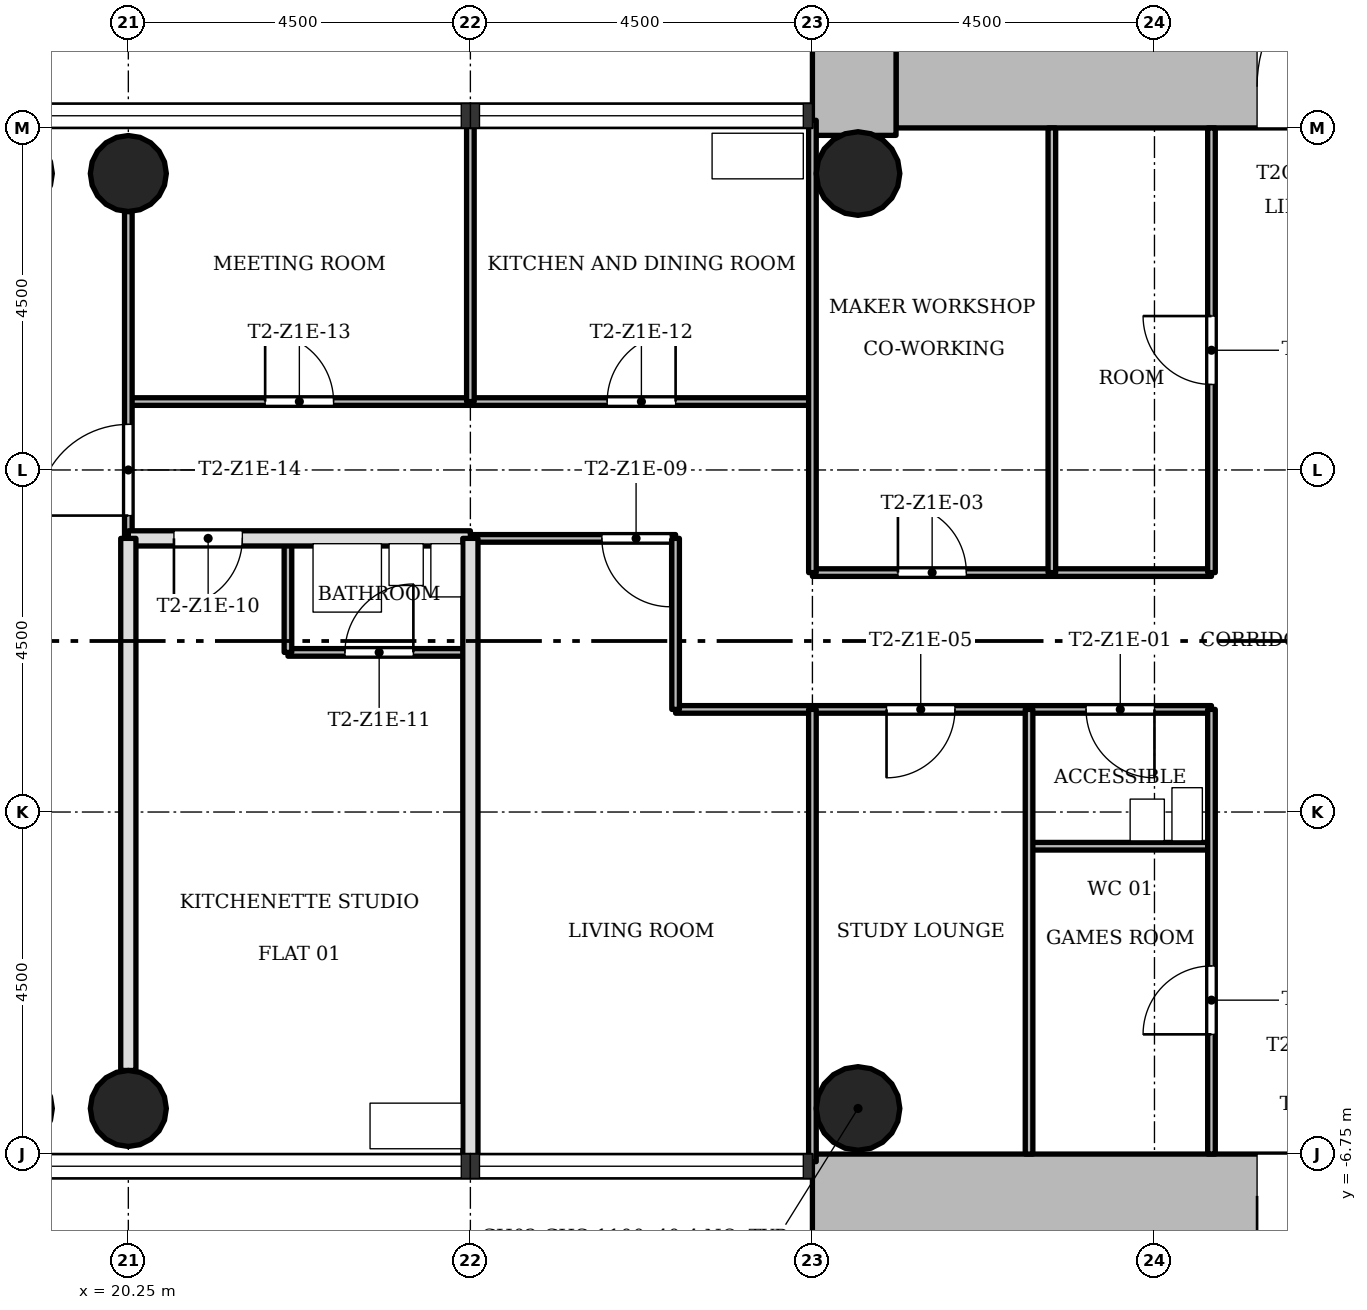
"""IFC4 building model, lengths in metres.
Left out: names, types, materials, properties, quantities, classifications, styles, units other than length and angle.
Written with IfcOpenShell. Run it as: python <this file> out.ifc"""

import sys

from ifc_helpers import new_model, si_unit, direction, frame, frame_2d, origin, origin_2d, place, context, subcontext, project, spatial, rectangle, hollow_circle, extrude, element, fill, save


model = new_model("IFC4")
c1 = context("Model", 3, precision=1e-05, world=origin(), true_north=direction((0.0, 1.0)))
c2 = subcontext(c1, "Body", "Model", "MODEL_VIEW")
j1 = project(units=[si_unit("LENGTHUNIT", "METRE"), si_unit("PLANEANGLEUNIT", "RADIAN")], contexts=[c1])
p1 = place(None, origin())
s1 = spatial("IfcSite", under=j1, at=p1, CompositionType="ELEMENT")
p2 = place(p1, origin())
s2 = spatial("IfcBuilding", under=s1, at=p2, CompositionType="ELEMENT")
p3 = place(p2, frame((0.0, 0.0, 65.3)))
s3 = spatial("IfcBuildingStorey", under=s2, at=p3, CompositionType="ELEMENT", Elevation=65.3)
p4 = place(p3, frame((30.35, 7.3, 0.0), z_axis=(0.0, 0.0, 1.0), x_axis=(1.0, 0.0, 0.0)))
e1 = element("IfcWall", 1, at=p4, inside=s3, PredefinedType="SHEAR", context=c2, shape_type="SweptSolid", body=[
    extrude(rectangle(XDim=12.4, YDim=1.1, at=frame_2d((6.2, 0.0))), origin(), (0.0, 0.0, 1.0), 3.4),
])
p5 = place(p4, frame((4.75, 0.0, 0.0)))
e2 = element("IfcOpeningElement", 2, at=p5, cuts=e1, PredefinedType="OPENING", context=c2, shape_type="SweptSolid", body=[
    extrude(rectangle(XDim=1.8, YDim=2.1, at=frame_2d((0.9, 1.05))), frame((0.0, 0.56, 0.0), z_axis=(0.0, -1.0, 0.0), x_axis=(1.0, 0.0, 0.0)), (0.0, 0.0, 1.0), 1.12),
])
p6 = place(p3, frame((29.8, 15.248, 0.0), z_axis=(0.0, 0.0, 1.0), x_axis=(0.0, -1.0, 0.0)))
e3 = element("IfcWall", 3, at=p6, inside=s3, PredefinedType="SHEAR", context=c2, shape_type="SweptSolid", body=[
    extrude(rectangle(XDim=8.596, YDim=1.1, at=frame_2d((4.298, 0.0))), origin(), (0.0, 0.0, 1.0), 3.4),
])
p7 = place(p3, frame((41.65, -7.3, 0.0), z_axis=(0.0, 0.0, 1.0), x_axis=(-1.0, 0.0, 0.0)))
e4 = element("IfcWall", 4, at=p7, inside=s3, PredefinedType="SHEAR", context=c2, shape_type="SweptSolid", body=[
    extrude(rectangle(XDim=12.4, YDim=1.1, at=frame_2d((6.2, 0.0))), origin(), (0.0, 0.0, 1.0), 3.4),
])
p8 = place(p7, frame((4.75, 0.0, 0.0)))
e5 = element("IfcOpeningElement", 5, at=p8, cuts=e4, PredefinedType="OPENING", context=c2, shape_type="SweptSolid", body=[
    extrude(rectangle(XDim=1.8, YDim=2.1, at=frame_2d((0.9, 1.05))), frame((0.0, 0.56, 0.0), z_axis=(0.0, -1.0, 0.0), x_axis=(1.0, 0.0, 0.0)), (0.0, 0.0, 1.0), 1.12),
])
for number, where, z_axis, x_axis in (
    (6, (20.25, 6.15, 0.0), (0.0, 0.0, 1.0), (1.0, 0.0, 0.0)),
    (7, (20.25, -6.15, 0.0), (0.0, 0.0, 1.0), (1.0, 0.0, 0.0)),
):
    element("IfcColumn", number, at=place(p3, frame(where, z_axis=z_axis, x_axis=x_axis)), inside=s3, PredefinedType="COLUMN", context=c2, shape_type="SweptSolid", body=[
        extrude(hollow_circle(Radius=0.5, WallThickness=0.036, at=origin_2d()), origin(), (0.0, 0.0, 1.0), 3.4),
    ])
for number, where, z_axis, x_axis in (
    (8, (29.85, 6.15, 0.0), (0.0, 0.0, 1.0), (1.0, 0.0, 0.0)),
    (9, (29.85, -6.15, 0.0), (0.0, 0.0, 1.0), (1.0, 0.0, 0.0)),
):
    element("IfcColumn", number, at=place(p3, frame(where, z_axis=z_axis, x_axis=x_axis)), inside=s3, PredefinedType="COLUMN", context=c2, shape_type="SweptSolid", body=[
        extrude(hollow_circle(Radius=0.55, WallThickness=0.04, at=origin_2d()), origin(), (0.0, 0.0, 1.0), 3.4),
    ])
p9 = place(p3, frame((34.5, -2.7, 0.0), z_axis=(0.0, 0.0, 1.0), x_axis=(-1.0, 0.0, 0.0)))
e10 = element("IfcWall", 10, at=p9, inside=s3, PredefinedType="PARTITIONING", context=c2, shape_type="SweptSolid", body=[
    extrude(rectangle(XDim=2.4, YDim=0.1, at=frame_2d((1.2, 0.0))), origin(), (0.0, 0.0, 1.0), 3.0),
])
p10 = place(p3, frame((34.5, -0.9, 0.0), z_axis=(0.0, 0.0, 1.0), x_axis=(-1.0, 0.0, 0.0)))
e11 = element("IfcWall", 11, at=p10, inside=s3, PredefinedType="PARTITIONING", context=c2, shape_type="SweptSolid", body=[
    extrude(rectangle(XDim=7.05, YDim=0.1, at=frame_2d((3.525, 0.0))), origin(), (0.0, 0.0, 1.0), 3.0),
])
p11 = place(p10, frame((0.75, 0.0, 0.0)))
e12 = element("IfcOpeningElement", 12, at=p11, cuts=e11, PredefinedType="OPENING", context=c2, shape_type="SweptSolid", body=[
    extrude(rectangle(XDim=0.9, YDim=2.1, at=frame_2d((0.45, 1.05))), frame((0.0, 0.06, 0.0), z_axis=(0.0, -1.0, 0.0), x_axis=(1.0, 0.0, 0.0)), (0.0, 0.0, 1.0), 0.12),
])
p12 = place(p10, frame((3.375, 0.0, 0.0)))
e13 = element("IfcOpeningElement", 13, at=p12, cuts=e11, PredefinedType="OPENING", context=c2, shape_type="SweptSolid", body=[
    extrude(rectangle(XDim=0.9, YDim=2.1, at=frame_2d((0.45, 1.05))), frame((0.0, 0.06, 0.0), z_axis=(0.0, -1.0, 0.0), x_axis=(1.0, 0.0, 0.0)), (0.0, 0.0, 1.0), 0.12),
])
p13 = place(p3, frame((24.75, -0.15, 0.0), z_axis=(0.0, 0.0, 1.0), x_axis=(-1.0, 0.0, 0.0)))
e14 = element("IfcWall", 14, at=p13, inside=s3, PredefinedType="PARTITIONING", context=c2, shape_type="SweptSolid", body=[
    extrude(rectangle(XDim=2.4, YDim=0.1, at=frame_2d((1.2, 0.0))), origin(), (0.0, 0.0, 1.0), 3.0),
])
p14 = place(p13, frame((0.75, 0.0, 0.0)))
e15 = element("IfcOpeningElement", 15, at=p14, cuts=e14, PredefinedType="OPENING", context=c2, shape_type="SweptSolid", body=[
    extrude(rectangle(XDim=0.9, YDim=2.1, at=frame_2d((0.45, 1.05))), frame((0.0, 0.06, 0.0), z_axis=(0.0, -1.0, 0.0), x_axis=(1.0, 0.0, 0.0)), (0.0, 0.0, 1.0), 0.12),
])
p15 = place(p3, frame((34.5, 0.9, 0.0), z_axis=(0.0, 0.0, 1.0), x_axis=(-1.0, 0.0, 0.0)))
e16 = element("IfcWall", 16, at=p15, inside=s3, PredefinedType="PARTITIONING", context=c2, shape_type="SweptSolid", body=[
    extrude(rectangle(XDim=5.25, YDim=0.1, at=frame_2d((2.625, 0.0))), origin(), (0.0, 0.0, 1.0), 3.0),
])
p16 = place(p15, frame((3.225, 0.0, 0.0)))
e17 = element("IfcOpeningElement", 17, at=p16, cuts=e16, PredefinedType="OPENING", context=c2, shape_type="SweptSolid", body=[
    extrude(rectangle(XDim=0.9, YDim=2.1, at=frame_2d((0.45, 1.05))), frame((0.0, 0.06, 0.0), z_axis=(0.0, -1.0, 0.0), x_axis=(1.0, 0.0, 0.0)), (0.0, 0.0, 1.0), 0.12),
])
p17 = place(p3, frame((27.45, 1.35, 0.0), z_axis=(0.0, 0.0, 1.0), x_axis=(-1.0, 0.0, 0.0)))
e18 = element("IfcWall", 18, at=p17, inside=s3, PredefinedType="PARTITIONING", context=c2, shape_type="SweptSolid", body=[
    extrude(rectangle(XDim=2.7, YDim=0.1, at=frame_2d((1.35, 0.0))), origin(), (0.0, 0.0, 1.0), 3.0),
])
p18 = place(p17, frame((0.07, 0.0, 0.0)))
e19 = element("IfcOpeningElement", 19, at=p18, cuts=e18, PredefinedType="OPENING", context=c2, shape_type="SweptSolid", body=[
    extrude(rectangle(XDim=0.9, YDim=2.1, at=frame_2d((0.45, 1.05))), frame((0.0, 0.06, 0.0), z_axis=(0.0, -1.0, 0.0), x_axis=(1.0, 0.0, 0.0)), (0.0, 0.0, 1.0), 0.12),
])
p19 = place(p3, frame((24.75, 1.35, 0.0), z_axis=(0.0, 0.0, 1.0), x_axis=(-1.0, 0.0, 0.0)))
e20 = element("IfcWall", 20, at=p19, inside=s3, PredefinedType="SOLIDWALL", context=c2, shape_type="SweptSolid", body=[
    extrude(rectangle(XDim=4.5, YDim=0.2, at=frame_2d((2.25, 0.0))), origin(), (0.0, 0.0, 1.0), 3.0),
])
p20 = place(p19, frame((3.0, 0.0, 0.0)))
e21 = element("IfcOpeningElement", 21, at=p20, cuts=e20, PredefinedType="OPENING", context=c2, shape_type="SweptSolid", body=[
    extrude(rectangle(XDim=0.9, YDim=2.1, at=frame_2d((0.45, 1.05))), frame((0.0, 0.11, 0.0), z_axis=(0.0, -1.0, 0.0), x_axis=(1.0, 0.0, 0.0)), (0.0, 0.0, 1.0), 0.22),
])
p21 = place(p3, frame((29.25, 3.15, 0.0), z_axis=(0.0, 0.0, 1.0), x_axis=(-1.0, 0.0, 0.0)))
e22 = element("IfcWall", 22, at=p21, inside=s3, PredefinedType="PARTITIONING", context=c2, shape_type="SweptSolid", body=[
    extrude(rectangle(XDim=9.0, YDim=0.1, at=frame_2d((4.5, 0.0))), origin(), (0.0, 0.0, 1.0), 3.0),
])
p22 = place(p21, frame((1.8, 0.0, 0.0)))
e23 = element("IfcOpeningElement", 23, at=p22, cuts=e22, PredefinedType="OPENING", context=c2, shape_type="SweptSolid", body=[
    extrude(rectangle(XDim=0.9, YDim=2.1, at=frame_2d((0.45, 1.05))), frame((0.0, 0.06, 0.0), z_axis=(0.0, -1.0, 0.0), x_axis=(1.0, 0.0, 0.0)), (0.0, 0.0, 1.0), 0.12),
])
p23 = place(p21, frame((6.3, 0.0, 0.0)))
e24 = element("IfcOpeningElement", 24, at=p23, cuts=e22, PredefinedType="OPENING", context=c2, shape_type="SweptSolid", body=[
    extrude(rectangle(XDim=0.9, YDim=2.1, at=frame_2d((0.45, 1.05))), frame((0.0, 0.06, 0.0), z_axis=(0.0, -1.0, 0.0), x_axis=(1.0, 0.0, 0.0)), (0.0, 0.0, 1.0), 0.12),
])
p24 = place(p3, frame((34.5, -6.75, 0.0), z_axis=(0.0, 0.0, 1.0), x_axis=(0.0, 1.0, 0.0)))
e25 = element("IfcWall", 25, at=p24, inside=s3, PredefinedType="PARTITIONING", context=c2, shape_type="SweptSolid", body=[
    extrude(rectangle(XDim=5.85, YDim=0.1, at=frame_2d((2.925, 0.0))), origin(), (0.0, 0.0, 1.0), 3.0),
])
p25 = place(p24, frame((1.575, 0.0, 0.0)))
e26 = element("IfcOpeningElement", 26, at=p25, cuts=e25, PredefinedType="OPENING", context=c2, shape_type="SweptSolid", body=[
    extrude(rectangle(XDim=0.9, YDim=2.1, at=frame_2d((0.45, 1.05))), frame((0.0, 0.06, 0.0), z_axis=(0.0, -1.0, 0.0), x_axis=(1.0, 0.0, 0.0)), (0.0, 0.0, 1.0), 0.12),
])
p26 = place(p3, frame((34.5, 0.9, 0.0), z_axis=(0.0, 0.0, 1.0), x_axis=(0.0, 1.0, 0.0)))
e27 = element("IfcWall", 27, at=p26, inside=s3, PredefinedType="PARTITIONING", context=c2, shape_type="SweptSolid", body=[
    extrude(rectangle(XDim=5.85, YDim=0.1, at=frame_2d((2.925, 0.0))), origin(), (0.0, 0.0, 1.0), 3.0),
])
p27 = place(p26, frame((2.475, 0.0, 0.0)))
e28 = element("IfcOpeningElement", 28, at=p27, cuts=e27, PredefinedType="OPENING", context=c2, shape_type="SweptSolid", body=[
    extrude(rectangle(XDim=0.9, YDim=2.1, at=frame_2d((0.45, 1.05))), frame((0.0, 0.06, 0.0), z_axis=(0.0, -1.0, 0.0), x_axis=(1.0, 0.0, 0.0)), (0.0, 0.0, 1.0), 0.12),
])
for number, where, z_axis, x_axis in (
    (29, (32.4, 0.9, 0.0), (0.0, 0.0, 1.0), (0.0, 1.0, 0.0)),
    (30, (32.1, -6.75, 0.0), (0.0, 0.0, 1.0), (0.0, 1.0, 0.0)),
):
    element("IfcWall", number, at=place(p3, frame(where, z_axis=z_axis, x_axis=x_axis)), inside=s3, PredefinedType="PARTITIONING", context=c2, shape_type="SweptSolid", body=[
        extrude(rectangle(XDim=5.85, YDim=0.1, at=frame_2d((2.925, 0.0))), origin(), (0.0, 0.0, 1.0), 3.0),
    ])
for number, where, z_axis, x_axis in (
    (31, (29.25, -6.85, 0.0), (0.0, 0.0, 1.0), (0.0, 1.0, 0.0)),
    (32, (29.25, 0.9, 0.0), (0.0, 0.0, 1.0), (0.0, 1.0, 0.0)),
):
    element("IfcWall", number, at=place(p3, frame(where, z_axis=z_axis, x_axis=x_axis)), inside=s3, PredefinedType="PARTITIONING", context=c2, shape_type="SweptSolid", body=[
        extrude(rectangle(XDim=5.95, YDim=0.1, at=frame_2d((2.975, 0.0))), origin(), (0.0, 0.0, 1.0), 3.0),
    ])
p28 = place(p3, frame((27.45, -0.9, 0.0), z_axis=(0.0, 0.0, 1.0), x_axis=(0.0, 1.0, 0.0)))
e33 = element("IfcWall", 33, at=p28, inside=s3, PredefinedType="PARTITIONING", context=c2, shape_type="SweptSolid", body=[
    extrude(rectangle(XDim=2.25, YDim=0.1, at=frame_2d((1.125, 0.0))), origin(), (0.0, 0.0, 1.0), 3.0),
])
p29 = place(p3, frame((24.75, 3.15, 0.0), z_axis=(0.0, 0.0, 1.0), x_axis=(0.0, 1.0, 0.0)))
e34 = element("IfcWall", 34, at=p29, inside=s3, PredefinedType="PARTITIONING", context=c2, shape_type="SweptSolid", body=[
    extrude(rectangle(XDim=3.7, YDim=0.1, at=frame_2d((1.85, 0.0))), origin(), (0.0, 0.0, 1.0), 3.0),
])
p30 = place(p3, frame((24.75, -6.85, 0.0), z_axis=(0.0, 0.0, 1.0), x_axis=(0.0, 1.0, 0.0)))
e35 = element("IfcWall", 35, at=p30, inside=s3, PredefinedType="SOLIDWALL", context=c2, shape_type="SweptSolid", body=[
    extrude(rectangle(XDim=8.2, YDim=0.2, at=frame_2d((4.1, 0.0))), origin(), (0.0, 0.0, 1.0), 3.0),
])
p31 = place(p3, frame((22.35, -0.15, 0.0), z_axis=(0.0, 0.0, 1.0), x_axis=(0.0, 1.0, 0.0)))
e36 = element("IfcWall", 36, at=p31, inside=s3, PredefinedType="PARTITIONING", context=c2, shape_type="SweptSolid", body=[
    extrude(rectangle(XDim=1.5, YDim=0.1, at=frame_2d((0.75, 0.0))), origin(), (0.0, 0.0, 1.0), 3.0),
])
p32 = place(p3, frame((20.25, 1.35, 0.0), z_axis=(0.0, 0.0, 1.0), x_axis=(0.0, 1.0, 0.0)))
e37 = element("IfcWall", 37, at=p32, inside=s3, PredefinedType="PARTITIONING", context=c2, shape_type="SweptSolid", body=[
    extrude(rectangle(XDim=4.3, YDim=0.1, at=frame_2d((2.15, 0.0))), origin(), (0.0, 0.0, 1.0), 3.0),
])
p33 = place(p32, frame((0.3, 0.0, 0.0)))
e38 = element("IfcOpeningElement", 38, at=p33, cuts=e37, PredefinedType="OPENING", context=c2, shape_type="SweptSolid", body=[
    extrude(rectangle(XDim=1.2, YDim=2.1, at=frame_2d((0.6, 1.05))), frame((0.0, 0.06, 0.0), z_axis=(0.0, -1.0, 0.0), x_axis=(1.0, 0.0, 0.0)), (0.0, 0.0, 1.0), 0.12),
])
p34 = place(p3, frame((20.25, -5.65, 0.0), z_axis=(0.0, 0.0, 1.0), x_axis=(0.0, 1.0, 0.0)))
e39 = element("IfcWall", 39, at=p34, inside=s3, PredefinedType="SOLIDWALL", context=c2, shape_type="SweptSolid", body=[
    extrude(rectangle(XDim=7.0, YDim=0.2, at=frame_2d((3.5, 0.0))), origin(), (0.0, 0.0, 1.0), 3.0),
])
p35 = place(p11, origin())
e40 = element("IfcDoor", 40, at=p35, inside=s3, OperationType="SINGLE_SWING_RIGHT", PredefinedType="DOOR", context=c2, shape_type="SweptSolid", body=[
    extrude(rectangle(XDim=0.9, YDim=2.1, at=frame_2d((0.45, 1.05))), frame((0.0, 0.025, 0.0), z_axis=(0.0, -1.0, 0.0), x_axis=(1.0, 0.0, 0.0)), (0.0, 0.0, 1.0), 0.05),
])
fill(e12, e40)
p36 = place(p27, origin())
e41 = element("IfcDoor", 41, at=p36, inside=s3, OperationType="SINGLE_SWING_LEFT", PredefinedType="DOOR", context=c2, shape_type="SweptSolid", body=[
    extrude(rectangle(XDim=0.9, YDim=2.1, at=frame_2d((0.45, 1.05))), frame((0.0, 0.025, 0.0), z_axis=(0.0, -1.0, 0.0), x_axis=(1.0, 0.0, 0.0)), (0.0, 0.0, 1.0), 0.05),
])
fill(e28, e41)
p37 = place(p16, origin())
e42 = element("IfcDoor", 42, at=p37, inside=s3, OperationType="SINGLE_SWING_RIGHT", PredefinedType="DOOR", context=c2, shape_type="SweptSolid", body=[
    extrude(rectangle(XDim=0.9, YDim=2.1, at=frame_2d((0.45, 1.05))), frame((0.0, 0.025, 0.0), z_axis=(0.0, -1.0, 0.0), x_axis=(1.0, 0.0, 0.0)), (0.0, 0.0, 1.0), 0.05),
])
fill(e17, e42)
p38 = place(p25, origin())
e43 = element("IfcDoor", 43, at=p38, inside=s3, OperationType="SINGLE_SWING_RIGHT", PredefinedType="DOOR", context=c2, shape_type="SweptSolid", body=[
    extrude(rectangle(XDim=0.9, YDim=2.1, at=frame_2d((0.45, 1.05))), frame((0.0, 0.025, 0.0), z_axis=(0.0, -1.0, 0.0), x_axis=(1.0, 0.0, 0.0)), (0.0, 0.0, 1.0), 0.05),
])
fill(e26, e43)
p39 = place(p12, origin())
e44 = element("IfcDoor", 44, at=p39, inside=s3, OperationType="SINGLE_SWING_LEFT", PredefinedType="DOOR", context=c2, shape_type="SweptSolid", body=[
    extrude(rectangle(XDim=0.9, YDim=2.1, at=frame_2d((0.45, 1.05))), frame((0.0, 0.025, 0.0), z_axis=(0.0, -1.0, 0.0), x_axis=(1.0, 0.0, 0.0)), (0.0, 0.0, 1.0), 0.05),
])
fill(e13, e44)
p40 = place(p18, origin())
e45 = element("IfcDoor", 45, at=p40, inside=s3, OperationType="SINGLE_SWING_RIGHT", PredefinedType="DOOR", context=c2, shape_type="SweptSolid", body=[
    extrude(rectangle(XDim=0.9, YDim=2.1, at=frame_2d((0.45, 1.05))), frame((0.0, 0.025, 0.0), z_axis=(0.0, -1.0, 0.0), x_axis=(1.0, 0.0, 0.0)), (0.0, 0.0, 1.0), 0.05),
])
fill(e19, e45)
p41 = place(p20, origin())
e46 = element("IfcDoor", 46, at=p41, inside=s3, OperationType="SINGLE_SWING_LEFT", PredefinedType="DOOR", context=c2, shape_type="SweptSolid", body=[
    extrude(rectangle(XDim=0.9, YDim=2.1, at=frame_2d((0.45, 1.05))), frame((0.0, 0.025, 0.0), z_axis=(0.0, -1.0, 0.0), x_axis=(1.0, 0.0, 0.0)), (0.0, 0.0, 1.0), 0.05),
])
fill(e21, e46)
p42 = place(p14, origin())
e47 = element("IfcDoor", 47, at=p42, inside=s3, OperationType="SINGLE_SWING_LEFT", PredefinedType="DOOR", context=c2, shape_type="SweptSolid", body=[
    extrude(rectangle(XDim=0.9, YDim=2.1, at=frame_2d((0.45, 1.05))), frame((0.0, 0.025, 0.0), z_axis=(0.0, -1.0, 0.0), x_axis=(1.0, 0.0, 0.0)), (0.0, 0.0, 1.0), 0.05),
])
fill(e15, e47)
p43 = place(p22, origin())
e48 = element("IfcDoor", 48, at=p43, inside=s3, OperationType="SINGLE_SWING_LEFT", PredefinedType="DOOR", context=c2, shape_type="SweptSolid", body=[
    extrude(rectangle(XDim=0.9, YDim=2.1, at=frame_2d((0.45, 1.05))), frame((0.0, 0.025, 0.0), z_axis=(0.0, -1.0, 0.0), x_axis=(1.0, 0.0, 0.0)), (0.0, 0.0, 1.0), 0.05),
])
fill(e23, e48)
p44 = place(p23, origin())
e49 = element("IfcDoor", 49, at=p44, inside=s3, OperationType="SINGLE_SWING_RIGHT", PredefinedType="DOOR", context=c2, shape_type="SweptSolid", body=[
    extrude(rectangle(XDim=0.9, YDim=2.1, at=frame_2d((0.45, 1.05))), frame((0.0, 0.025, 0.0), z_axis=(0.0, -1.0, 0.0), x_axis=(1.0, 0.0, 0.0)), (0.0, 0.0, 1.0), 0.05),
])
fill(e24, e49)
p45 = place(p33, origin())
e50 = element("IfcDoor", 50, at=p45, inside=s3, OperationType="SINGLE_SWING_RIGHT", PredefinedType="DOOR", context=c2, shape_type="SweptSolid", body=[
    extrude(rectangle(XDim=1.2, YDim=2.1, at=frame_2d((0.6, 1.05))), frame((0.0, 0.025, 0.0), z_axis=(0.0, -1.0, 0.0), x_axis=(1.0, 0.0, 0.0)), (0.0, 0.0, 1.0), 0.05),
])
fill(e38, e50)
p46 = place(p5, origin())
e51 = element("IfcDoor", 51, at=p46, inside=s3, OperationType="SINGLE_SWING_LEFT", PredefinedType="DOOR", context=c2, shape_type="SweptSolid", body=[
    extrude(rectangle(XDim=1.8, YDim=2.1, at=frame_2d((0.9, 1.05))), frame((0.0, 0.025, 0.0), z_axis=(0.0, -1.0, 0.0), x_axis=(1.0, 0.0, 0.0)), (0.0, 0.0, 1.0), 0.05),
])
fill(e2, e51)
p47 = place(p8, origin())
e52 = element("IfcDoor", 52, at=p47, inside=s3, OperationType="SINGLE_SWING_LEFT", PredefinedType="DOOR", context=c2, shape_type="SweptSolid", body=[
    extrude(rectangle(XDim=1.8, YDim=2.1, at=frame_2d((0.9, 1.05))), frame((0.0, 0.025, 0.0), z_axis=(0.0, -1.0, 0.0), x_axis=(1.0, 0.0, 0.0)), (0.0, 0.0, 1.0), 0.05),
])
fill(e5, e52)
save(model, sys.argv[1])
